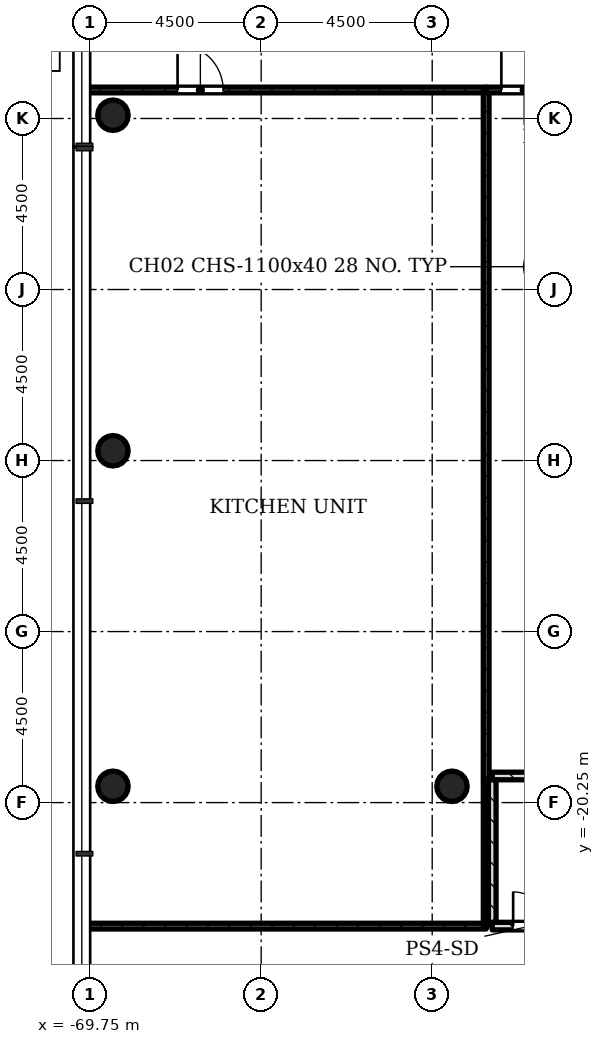
"""IFC4 building model, lengths in metres.
Left out: names, types, materials, properties, quantities, classifications, styles, units other than length and angle.
Written with IfcOpenShell. Run it as: python <this file> out.ifc"""

import sys

from ifc_helpers import new_model, si_unit, direction, frame, frame_2d, origin, origin_2d, place, context, subcontext, project, spatial, rectangle, hollow_circle, extrude, element, fill, save


model = new_model("IFC4")
c1 = context("Model", 3, precision=1e-05, world=origin(), true_north=direction((0.0, 1.0)))
c2 = subcontext(c1, "Body", "Model", "MODEL_VIEW")
j1 = project(units=[si_unit("LENGTHUNIT", "METRE"), si_unit("PLANEANGLEUNIT", "RADIAN")], contexts=[c1])
p1 = place(None, origin())
s1 = spatial("IfcSite", under=j1, at=p1, CompositionType="ELEMENT")
p2 = place(p1, origin())
s2 = spatial("IfcBuilding", under=s1, at=p2, CompositionType="ELEMENT")
p3 = place(p2, frame((0.0, 0.0, 6.0)))
s3 = spatial("IfcBuildingStorey", under=s2, at=p3, CompositionType="ELEMENT", Elevation=6.0)
for number, where, z_axis, x_axis in (
    (1, (-69.15, -19.821, 0.0), (0.0, 0.0, 1.0), (1.0, 0.0, 0.0)),
    (2, (-60.23, -19.821, 0.0), (0.0, 0.0, 1.0), (1.0, 0.0, 0.0)),
    (3, (-69.15, -10.993, 0.0), (0.0, 0.0, 1.0), (1.0, 0.0, 0.0)),
    (4, (-69.15, -2.164, 0.0), (0.0, 0.0, 1.0), (1.0, 0.0, 0.0)),
):
    element("IfcColumn", number, at=place(p3, frame(where, z_axis=z_axis, x_axis=x_axis)), inside=s3, PredefinedType="COLUMN", context=c2, shape_type="SweptSolid", body=[
        extrude(hollow_circle(Radius=0.4, WallThickness=0.028, at=origin_2d()), origin(), (0.0, 0.0, 1.0), 5.0),
    ])
p4 = place(p3, frame((-69.85, -1.5, 0.0), z_axis=(0.0, 0.0, 1.0), x_axis=(1.0, 0.0, 0.0)))
e5 = element("IfcWall", 5, at=p4, inside=s3, PredefinedType="PARTITIONING", context=c2, shape_type="SweptSolid", body=[
    extrude(rectangle(XDim=10.52, YDim=0.15, at=frame_2d((5.26, 0.0))), origin(), (0.0, 0.0, 1.0), 4.58),
])
p5 = place(p4, frame((2.4, 0.0, 0.0)))
e6 = element("IfcOpeningElement", 6, at=p5, cuts=e5, PredefinedType="OPENING", context=c2, shape_type="SweptSolid", body=[
    extrude(rectangle(XDim=1.2, YDim=2.1, at=frame_2d((0.6, 1.05))), frame((0.0, 0.085, 0.0), z_axis=(0.0, -1.0, 0.0), x_axis=(1.0, 0.0, 0.0)), (0.0, 0.0, 1.0), 0.17),
])
p6 = place(p3, frame((-59.33, -23.5, 0.0), z_axis=(0.0, 0.0, 1.0), x_axis=(-1.0, 0.0, 0.0)))
e7 = element("IfcWall", 7, at=p6, inside=s3, PredefinedType="PARTITIONING", context=c2, shape_type="SweptSolid", body=[
    extrude(rectangle(XDim=10.52, YDim=0.15, at=frame_2d((5.26, 0.0))), origin(), (0.0, 0.0, 1.0), 4.58),
])
p7 = place(p3, frame((-59.33, -1.5, 0.0), z_axis=(0.0, 0.0, 1.0), x_axis=(0.0, -1.0, 0.0)))
e8 = element("IfcWall", 8, at=p7, inside=s3, PredefinedType="PARTITIONING", context=c2, shape_type="SweptSolid", body=[
    extrude(rectangle(XDim=22.0, YDim=0.15, at=frame_2d((11.0, 0.0))), origin(), (0.0, 0.0, 1.0), 4.58),
])
p8 = place(p3, frame((-59.33, -1.5, 0.0), z_axis=(0.0, 0.0, 1.0), x_axis=(1.0, 0.0, 0.0)))
e9 = element("IfcWall", 9, at=p8, inside=s3, PredefinedType="PARTITIONING", context=c2, shape_type="SweptSolid", body=[
    extrude(rectangle(XDim=7.58, YDim=0.15, at=frame_2d((3.79, 0.0))), origin(), (0.0, 0.0, 1.0), 4.58),
])
p9 = place(p8, frame((0.4, 0.0, 0.0)))
e10 = element("IfcOpeningElement", 10, at=p9, cuts=e9, PredefinedType="OPENING", context=c2, shape_type="SweptSolid", body=[
    extrude(rectangle(XDim=1.2, YDim=2.1, at=frame_2d((0.6, 1.05))), frame((0.0, 0.085, 0.0), z_axis=(0.0, -1.0, 0.0), x_axis=(1.0, 0.0, 0.0)), (0.0, 0.0, 1.0), 0.17),
])
p10 = place(p3, frame((-59.17, -23.5, 0.0), z_axis=(0.0, 0.0, 1.0), x_axis=(1.0, 0.0, 0.0)))
e11 = element("IfcWall", 11, at=p10, inside=s3, PredefinedType="SHEAR", context=c2, shape_type="SweptSolid", body=[
    extrude(rectangle(XDim=6.8, YDim=0.2, at=frame_2d((3.4, 0.0))), origin(), (0.0, 0.0, 1.0), 4.58),
])
p11 = place(p10, frame((0.55, 0.0, 0.0)))
e12 = element("IfcOpeningElement", 12, at=p11, cuts=e11, PredefinedType="OPENING", context=c2, shape_type="SweptSolid", body=[
    extrude(rectangle(XDim=0.9, YDim=2.1, at=frame_2d((0.45, 1.05))), frame((0.0, 0.11, 0.0), z_axis=(0.0, -1.0, 0.0), x_axis=(1.0, 0.0, 0.0)), (0.0, 0.0, 1.0), 0.22),
])
p12 = place(p3, frame((-59.17, -19.55, 0.0), z_axis=(0.0, 0.0, 1.0), x_axis=(1.0, 0.0, 0.0)))
e13 = element("IfcWall", 13, at=p12, inside=s3, PredefinedType="SHEAR", context=c2, shape_type="SweptSolid", body=[
    extrude(rectangle(XDim=6.8, YDim=0.2, at=frame_2d((3.4, 0.0))), origin(), (0.0, 0.0, 1.0), 4.58),
])
p13 = place(p3, frame((-59.17, -23.4, 0.0), z_axis=(0.0, 0.0, 1.0), x_axis=(0.0, 1.0, 0.0)))
e14 = element("IfcWall", 14, at=p13, inside=s3, PredefinedType="SHEAR", context=c2, shape_type="SweptSolid", body=[
    extrude(rectangle(XDim=3.75, YDim=0.2, at=frame_2d((1.875, 0.0))), origin(), (0.0, 0.0, 1.0), 4.58),
])
p14 = place(p5, origin())
e15 = element("IfcDoor", 15, at=p14, inside=s3, OperationType="SINGLE_SWING_RIGHT", PredefinedType="DOOR", context=c2, shape_type="SweptSolid", body=[
    extrude(rectangle(XDim=1.2, YDim=2.1, at=frame_2d((0.6, 1.05))), frame((0.0, 0.025, 0.0), z_axis=(0.0, -1.0, 0.0), x_axis=(1.0, 0.0, 0.0)), (0.0, 0.0, 1.0), 0.05),
])
fill(e6, e15)
p15 = place(p9, origin())
e16 = element("IfcDoor", 16, at=p15, inside=s3, OperationType="SINGLE_SWING_RIGHT", PredefinedType="DOOR", context=c2, shape_type="SweptSolid", body=[
    extrude(rectangle(XDim=1.2, YDim=2.1, at=frame_2d((0.6, 1.05))), frame((0.0, 0.025, 0.0), z_axis=(0.0, -1.0, 0.0), x_axis=(1.0, 0.0, 0.0)), (0.0, 0.0, 1.0), 0.05),
])
fill(e10, e16)
p16 = place(p11, origin())
e17 = element("IfcDoor", 17, at=p16, inside=s3, OperationType="SINGLE_SWING_RIGHT", PredefinedType="DOOR", context=c2, shape_type="SweptSolid", body=[
    extrude(rectangle(XDim=0.9, YDim=2.1, at=frame_2d((0.45, 1.05))), frame((0.0, 0.025, 0.0), z_axis=(0.0, -1.0, 0.0), x_axis=(1.0, 0.0, 0.0)), (0.0, 0.0, 1.0), 0.05),
])
fill(e12, e17)
save(model, sys.argv[1])
